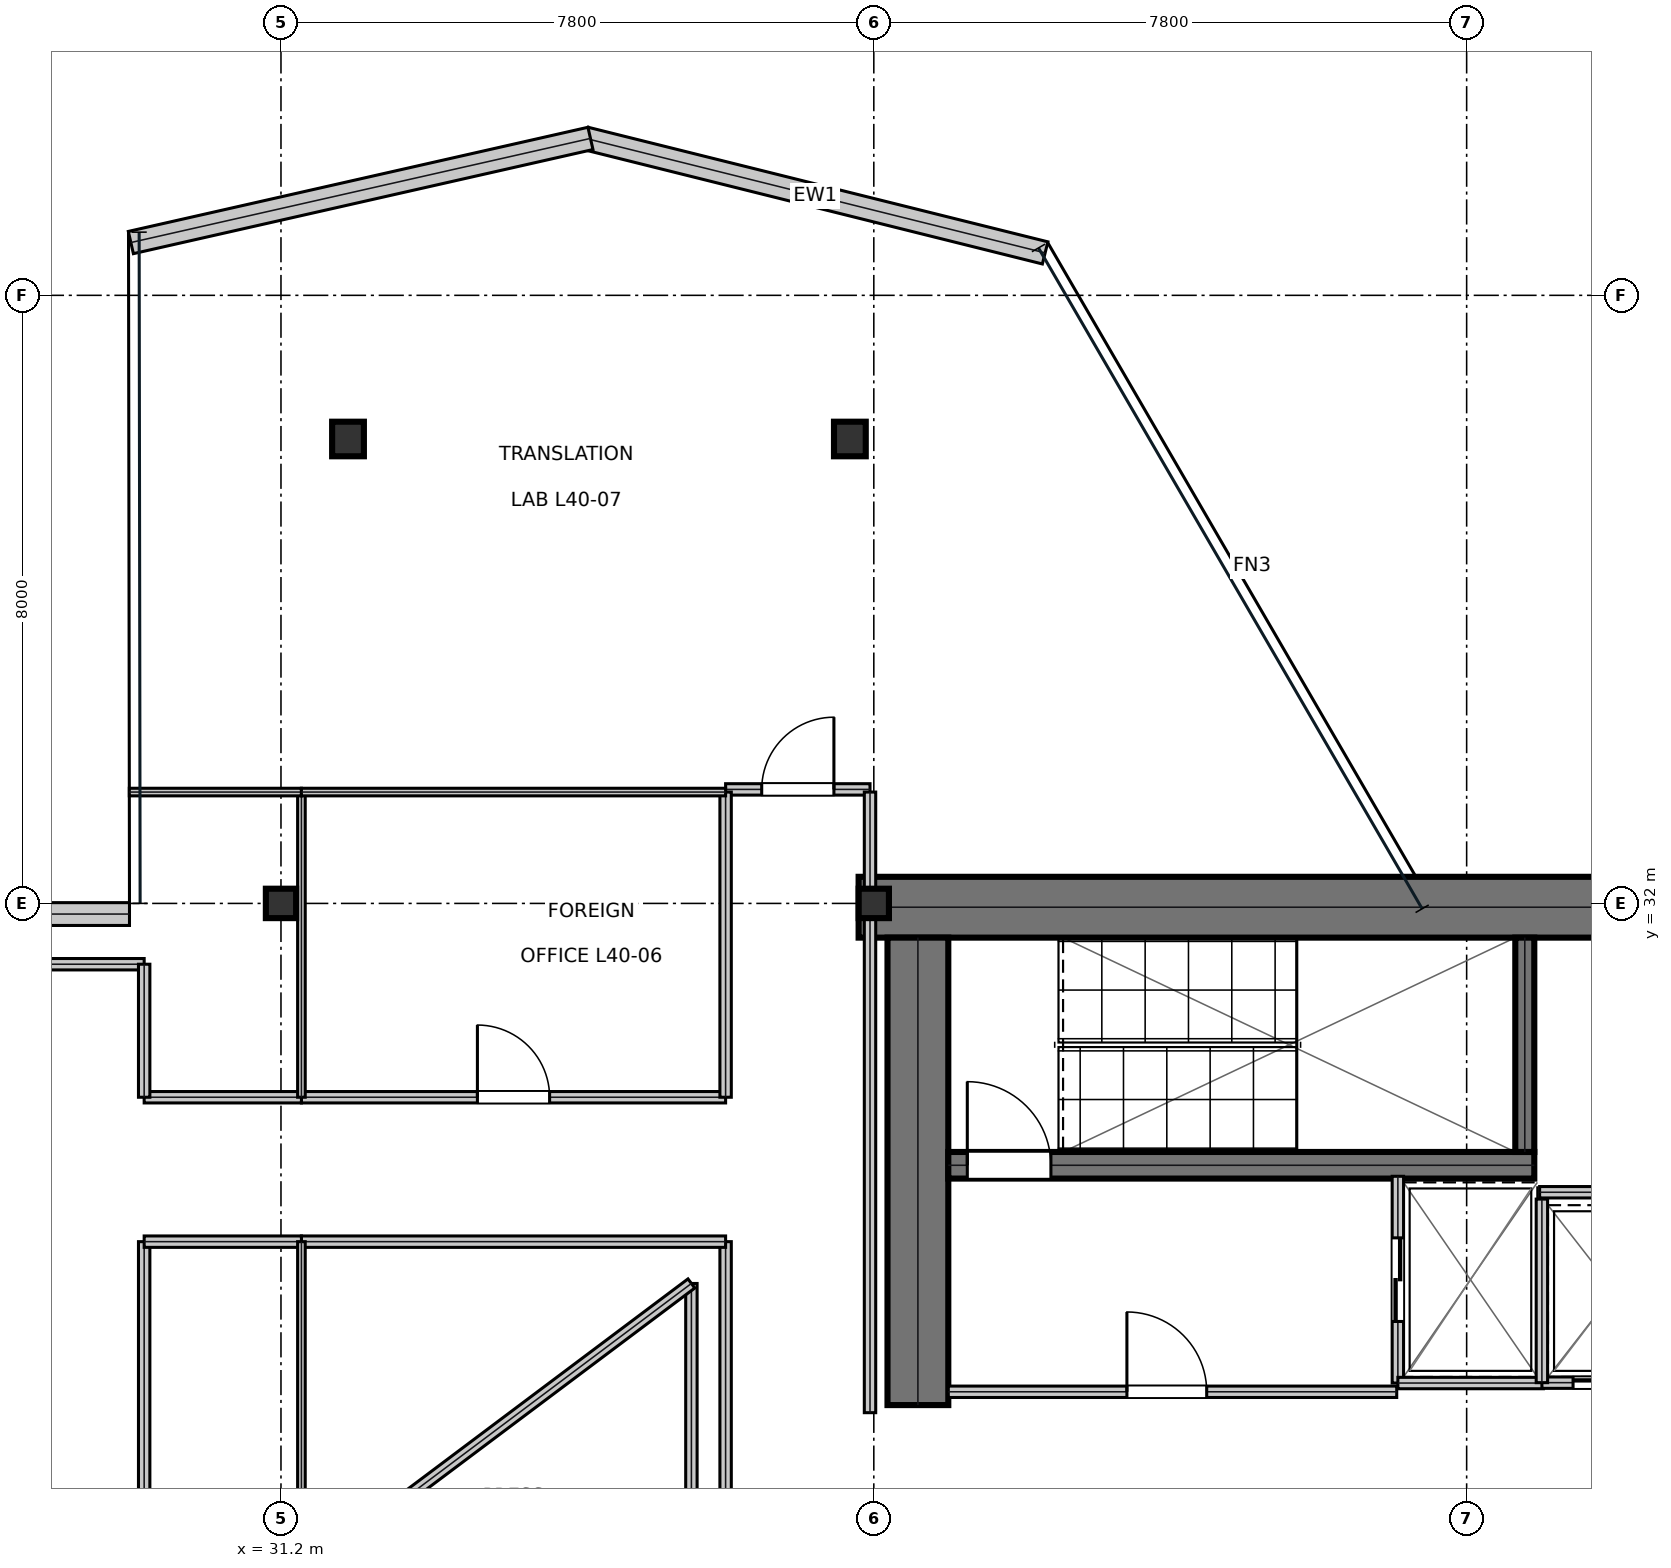
"""IFC4 building model, lengths in metres.
Left out: names, types, materials, properties, quantities, classifications, styles, units other than length and angle.
Written with IfcOpenShell. Run it as: python <this file> out.ifc"""

import sys

from ifc_helpers import new_model, si_unit, direction, frame, frame_2d, origin, origin_2d, place, context, subcontext, project, spatial, rectangle, i_section, extrude, element, fill, save


model = new_model("IFC4")
c1 = context("Model", 3, precision=1e-05, world=origin(), true_north=direction((0.0, 1.0)))
c2 = subcontext(c1, "Body", "Model", "MODEL_VIEW")
j1 = project(units=[si_unit("LENGTHUNIT", "METRE"), si_unit("PLANEANGLEUNIT", "RADIAN")], contexts=[c1])
p1 = place(None, origin())
s1 = spatial("IfcSite", under=j1, at=p1, CompositionType="ELEMENT")
p2 = place(p1, origin())
s2 = spatial("IfcBuilding", under=s1, at=p2, CompositionType="ELEMENT")
p3 = place(p2, frame((0.0, 0.0, 173.55)))
s3 = spatial("IfcBuildingStorey", under=s2, at=p3, CompositionType="ELEMENT", Elevation=173.55)
p4 = place(p3, frame((38.8, 31.95, 0.0), z_axis=(0.0, 0.0, 1.0), x_axis=(1.0, 0.0, 0.0)))
e1 = element("IfcWall", 1, at=p4, inside=s3, PredefinedType="SHEAR", context=c2, shape_type="SweptSolid", body=[
    extrude(rectangle(XDim=16.0, YDim=0.8, at=frame_2d((8.0, 0.0))), origin(), (0.0, 0.0, 1.0), 3.81),
])
p5 = place(p3, frame((39.58, 25.4, 0.0), z_axis=(0.0, 0.0, 1.0), x_axis=(0.0, 1.0, 0.0)))
e2 = element("IfcWall", 2, at=p5, inside=s3, PredefinedType="SHEAR", context=c2, shape_type="SweptSolid", body=[
    extrude(rectangle(XDim=6.15, YDim=0.8, at=frame_2d((3.075, 0.0))), origin(), (0.0, 0.0, 1.0), 3.81),
])
p6 = place(p3, frame((39.98, 28.555, 0.0), z_axis=(0.0, 0.0, 1.0), x_axis=(1.0, 0.0, 0.0)))
e3 = element("IfcWall", 3, at=p6, inside=s3, PredefinedType="SHEAR", context=c2, shape_type="SweptSolid", body=[
    extrude(rectangle(XDim=7.71, YDim=0.35, at=frame_2d((3.855, 0.0))), origin(), (0.0, 0.0, 1.0), 3.81),
])
p7 = place(p6, frame((0.25, 0.0, 0.0)))
e4 = element("IfcOpeningElement", 4, at=p7, cuts=e3, PredefinedType="OPENING", context=c2, shape_type="SweptSolid", body=[
    extrude(rectangle(XDim=1.1, YDim=2.15, at=frame_2d((0.55, 1.075))), frame((0.0, 0.185, 0.0), z_axis=(0.0, -1.0, 0.0), x_axis=(1.0, 0.0, 0.0)), (0.0, 0.0, 1.0), 0.37),
])
p8 = place(p3, frame((47.565, 28.73, 0.0), z_axis=(0.0, 0.0, 1.0), x_axis=(0.0, 1.0, 0.0)))
e5 = element("IfcWall", 5, at=p8, inside=s3, PredefinedType="SHEAR", context=c2, shape_type="SweptSolid", body=[
    extrude(rectangle(XDim=2.82, YDim=0.25, at=frame_2d((1.41, 0.0))), origin(), (0.0, 0.0, 1.0), 3.81),
])
for number, where, z_axis, x_axis in (
    (6, (31.2, 32.0, 0.0), (0.0, 0.0, 1.0), (1.0, 0.0, 0.0)),
    (7, (39.0, 32.0, 0.0), (0.0, 0.0, 1.0), (1.0, 0.0, 0.0)),
):
    element("IfcColumn", number, at=place(p3, frame(where, z_axis=z_axis, x_axis=x_axis)), inside=s3, PredefinedType="COLUMN", context=c2, shape_type="SweptSolid", body=[
        extrude(i_section(OverallWidth=0.398, OverallDepth=0.387, WebThickness=0.021, FlangeThickness=0.033, at=origin_2d()), origin(), (0.0, 0.0, 1.0), 4.044),
    ])
p9 = place(p3, frame((32.082, 38.11, 0.016), z_axis=(0.010447648562, -0.022413850693, 0.999694186207), x_axis=(0.906371306068, 0.422482018004, 0.0)))
e8 = element("IfcColumn", 8, at=p9, inside=s3, PredefinedType="COLUMN", context=c2, shape_type="SweptSolid", body=[
    extrude(i_section(OverallWidth=0.418, OverallDepth=0.455, WebThickness=0.042, FlangeThickness=0.068, at=origin_2d()), origin(), (0.0, 0.0, 1.0), 4.019),
])
p10 = place(p3, frame((38.685, 38.11, 0.016), z_axis=(-0.003766191696, -0.022414915097, 0.999741660321), x_axis=(0.986176372522, -0.165699011101, 0.0)))
e9 = element("IfcColumn", 9, at=p10, inside=s3, PredefinedType="COLUMN", context=c2, shape_type="SweptSolid", body=[
    extrude(i_section(OverallWidth=0.418, OverallDepth=0.455, WebThickness=0.042, FlangeThickness=0.068, at=origin_2d()), origin(), (0.0, 0.0, 1.0), 4.019),
])
p11 = place(p3, frame((41.254, 40.558, 0.0), z_axis=(0.0, 0.0, 1.0), x_axis=(-0.970319679145, 0.241825805619, 0.0)))
e10 = element("IfcWall", 10, at=p11, inside=s3, PredefinedType="STANDARD", context=c2, shape_type="SweptSolid", body=[
    extrude(rectangle(XDim=6.232, YDim=0.3, at=frame_2d((3.116, 0.0))), origin(), (0.0, 0.0, 1.0), 3.81),
])
p12 = place(p3, frame((35.272, 42.064, 0.0), z_axis=(0.0, 0.0, 1.0), x_axis=(-0.975288491541, -0.220935190199, 0.0)))
e11 = element("IfcWall", 11, at=p12, inside=s3, PredefinedType="STANDARD", context=c2, shape_type="SweptSolid", body=[
    extrude(rectangle(XDim=6.2, YDim=0.3, at=frame_2d((3.1, 0.0))), origin(), (0.0, 0.0, 1.0), 3.81),
])
p13 = place(p3, frame((29.207, 31.86, 0.0), z_axis=(0.0, 0.0, 1.0), x_axis=(-1.0, 0.0, 0.0)))
e12 = element("IfcWall", 12, at=p13, inside=s3, PredefinedType="STANDARD", context=c2, shape_type="SweptSolid", body=[
    extrude(rectangle(XDim=2.799, YDim=0.3, at=frame_2d((1.399, 0.0))), origin(), (0.0, 0.0, 1.0), 3.81),
])
p14 = place(p3, frame((39.98, 25.575, 0.0), z_axis=(0.0, 0.0, 1.0), x_axis=(1.0, 0.0, 0.0)))
e13 = element("IfcWall", 13, at=p14, inside=s3, PredefinedType="PARTITIONING", context=c2, shape_type="SweptSolid", body=[
    extrude(rectangle(XDim=5.9, YDim=0.15, at=frame_2d((2.95, 0.0))), origin(), (0.0, 0.0, 1.0), 3.81),
])
p15 = place(p14, frame((2.35, 0.0, 0.0)))
e14 = element("IfcOpeningElement", 14, at=p15, cuts=e13, PredefinedType="OPENING", context=c2, shape_type="SweptSolid", body=[
    extrude(rectangle(XDim=1.05, YDim=2.15, at=frame_2d((0.525, 1.075))), frame((0.0, 0.085, 0.0), z_axis=(0.0, -1.0, 0.0), x_axis=(1.0, 0.0, 0.0)), (0.0, 0.0, 1.0), 0.17),
])
p16 = place(p3, frame((45.895, 25.69, 0.0), z_axis=(0.0, 0.0, 1.0), x_axis=(0.0, 1.0, 0.0)))
e15 = element("IfcWall", 15, at=p16, inside=s3, PredefinedType="PARTITIONING", context=c2, shape_type="SweptSolid", body=[
    extrude(rectangle(XDim=2.72, YDim=0.15, at=frame_2d((1.36, 0.0))), origin(), (0.0, 0.0, 1.0), 3.81),
])
p17 = place(p16, frame((0.81, 0.0, 0.0)))
e16 = element("IfcOpeningElement", 16, at=p17, cuts=e15, PredefinedType="OPENING", context=c2, shape_type="SweptSolid", body=[
    extrude(rectangle(XDim=1.1, YDim=2.15, at=frame_2d((0.55, 1.075))), frame((0.0, 0.085, 0.0), z_axis=(0.0, -1.0, 0.0), x_axis=(1.0, 0.0, 0.0)), (0.0, 0.0, 1.0), 0.17),
])
p18 = place(p3, frame((45.895, 25.69, 0.0), z_axis=(0.0, 0.0, 1.0), x_axis=(1.0, 0.0, 0.0)))
e17 = element("IfcWall", 17, at=p18, inside=s3, PredefinedType="PARTITIONING", context=c2, shape_type="SweptSolid", body=[
    extrude(rectangle(XDim=1.915, YDim=0.15, at=frame_2d((0.958, 0.0))), origin(), (0.0, 0.0, 1.0), 3.81),
])
p19 = place(p3, frame((47.79, 25.695, 0.0), z_axis=(0.0, 0.0, 1.0), x_axis=(1.0, 0.0, 0.0)))
e18 = element("IfcWall", 18, at=p19, inside=s3, PredefinedType="PARTITIONING", context=c2, shape_type="SweptSolid", body=[
    extrude(rectangle(XDim=1.92, YDim=0.15, at=frame_2d((0.96, 0.0))), origin(), (0.0, 0.0, 1.0), 3.81),
])
p20 = place(p19, frame((0.41, 0.0, 0.0)))
e19 = element("IfcOpeningElement", 19, at=p20, cuts=e18, PredefinedType="OPENING", context=c2, shape_type="SweptSolid", body=[
    extrude(rectangle(XDim=1.1, YDim=2.15, at=frame_2d((0.55, 1.075))), frame((0.0, 0.085, 0.0), z_axis=(0.0, -1.0, 0.0), x_axis=(1.0, 0.0, 0.0)), (0.0, 0.0, 1.0), 0.17),
])
p21 = place(p3, frame((47.79, 25.695, 0.0), z_axis=(0.0, 0.0, 1.0), x_axis=(0.0, 1.0, 0.0)))
e20 = element("IfcWall", 20, at=p21, inside=s3, PredefinedType="PARTITIONING", context=c2, shape_type="SweptSolid", body=[
    extrude(rectangle(XDim=2.415, YDim=0.15, at=frame_2d((1.208, 0.0))), origin(), (0.0, 0.0, 1.0), 3.81),
])
p22 = place(p3, frame((47.76, 28.2, 0.0), z_axis=(0.0, 0.0, 1.0), x_axis=(1.0, 0.0, 0.0)))
e21 = element("IfcWall", 21, at=p22, inside=s3, PredefinedType="PARTITIONING", context=c2, shape_type="SweptSolid", body=[
    extrude(rectangle(XDim=1.99, YDim=0.15, at=frame_2d((0.995, 0.0))), origin(), (0.0, 0.0, 1.0), 3.81),
])
p23 = place(p3, frame((37.05, 14.535, 0.0), z_axis=(0.0, 0.0, 1.0), x_axis=(0.0, 1.0, 0.0)))
e22 = element("IfcWall", 22, at=p23, inside=s3, PredefinedType="PARTITIONING", context=c2, shape_type="SweptSolid", body=[
    extrude(rectangle(XDim=13.015, YDim=0.15, at=frame_2d((6.508, 0.0))), origin(), (0.0, 0.0, 1.0), 3.19),
])
p24 = place(p23, frame((4.593, 0.0, 0.0)))
e23 = element("IfcOpeningElement", 23, at=p24, cuts=e22, PredefinedType="OPENING", context=c2, shape_type="SweptSolid", body=[
    extrude(rectangle(XDim=0.95, YDim=2.15, at=frame_2d((0.475, 1.075))), frame((0.0, 0.085, 0.0), z_axis=(0.0, -1.0, 0.0), x_axis=(1.0, 0.0, 0.0)), (0.0, 0.0, 1.0), 0.17),
])
p25 = place(p3, frame((29.4, 16.8, 0.0), z_axis=(0.0, 0.0, 1.0), x_axis=(0.0, 1.0, 0.0)))
e24 = element("IfcWall", 24, at=p25, inside=s3, PredefinedType="PARTITIONING", context=c2, shape_type="SweptSolid", body=[
    extrude(rectangle(XDim=10.75, YDim=0.15, at=frame_2d((5.375, 0.0))), origin(), (0.0, 0.0, 1.0), 3.19),
])
p26 = place(p25, frame((4.54, 0.0, 0.0)))
e25 = element("IfcOpeningElement", 25, at=p26, cuts=e24, PredefinedType="OPENING", context=c2, shape_type="SweptSolid", body=[
    extrude(rectangle(XDim=0.95, YDim=2.15, at=frame_2d((0.475, 1.075))), frame((0.0, 0.085, 0.0), z_axis=(0.0, -1.0, 0.0), x_axis=(1.0, 0.0, 0.0)), (0.0, 0.0, 1.0), 0.17),
])
p27 = place(p3, frame((31.469, 29.45, 0.0), z_axis=(0.0, 0.0, 1.0), x_axis=(1.0, 0.0, 0.0)))
e26 = element("IfcWall", 26, at=p27, inside=s3, PredefinedType="PARTITIONING", context=c2, shape_type="SweptSolid", body=[
    extrude(rectangle(XDim=5.581, YDim=0.15, at=frame_2d((2.791, 0.0))), origin(), (0.0, 0.0, 1.0), 3.81),
])
p28 = place(p27, frame((2.315, 0.0, 0.0)))
e27 = element("IfcOpeningElement", 27, at=p28, cuts=e26, PredefinedType="OPENING", context=c2, shape_type="SweptSolid", body=[
    extrude(rectangle(XDim=0.95, YDim=2.15, at=frame_2d((0.475, 1.075))), frame((0.0, 0.085, 0.0), z_axis=(0.0, -1.0, 0.0), x_axis=(1.0, 0.0, 0.0)), (0.0, 0.0, 1.0), 0.17),
])
p29 = place(p3, frame((37.05, 33.5, 0.0), z_axis=(0.0, 0.0, 1.0), x_axis=(1.0, 0.0, 0.0)))
e28 = element("IfcWall", 28, at=p29, inside=s3, PredefinedType="PARTITIONING", context=c2, shape_type="SweptSolid", body=[
    extrude(rectangle(XDim=1.9, YDim=0.15, at=frame_2d((0.95, 0.0))), origin(), (0.0, 0.0, 1.0), 3.19),
])
p30 = place(p29, frame((0.475, 0.0, 0.0)))
e29 = element("IfcOpeningElement", 29, at=p30, cuts=e28, PredefinedType="OPENING", context=c2, shape_type="SweptSolid", body=[
    extrude(rectangle(XDim=0.95, YDim=2.15, at=frame_2d((0.475, 1.075))), frame((0.0, 0.085, 0.0), z_axis=(0.0, -1.0, 0.0), x_axis=(1.0, 0.0, 0.0)), (0.0, 0.0, 1.0), 0.17),
])
p31 = place(p3, frame((31.469, 27.55, 0.0), z_axis=(0.0, 0.0, 1.0), x_axis=(1.0, 0.0, 0.0)))
e30 = element("IfcWall", 30, at=p31, inside=s3, PredefinedType="PARTITIONING", context=c2, shape_type="SweptSolid", body=[
    extrude(rectangle(XDim=5.581, YDim=0.15, at=frame_2d((2.791, 0.0))), origin(), (0.0, 0.0, 1.0), 3.443),
])
for number, where, z_axis, x_axis in (
    (31, (29.4, 27.55, 0.0), (0.0, 0.0, 1.0), (1.0, 0.0, 0.0)),
    (32, (29.4, 29.45, 0.0), (0.0, 0.0, 1.0), (1.0, 0.0, 0.0)),
):
    element("IfcWall", number, at=place(p3, frame(where, z_axis=z_axis, x_axis=x_axis)), inside=s3, PredefinedType="PARTITIONING", context=c2, shape_type="SweptSolid", body=[
        extrude(rectangle(XDim=2.069, YDim=0.15, at=frame_2d((1.035, 0.0))), origin(), (0.0, 0.0, 1.0), 3.19),
    ])
p32 = place(p3, frame((27.5, 31.2, 0.0), z_axis=(0.0, 0.0, 1.0), x_axis=(1.0, 0.0, 0.0)))
e33 = element("IfcWall", 33, at=p32, inside=s3, PredefinedType="PARTITIONING", context=c2, shape_type="SweptSolid", body=[
    extrude(rectangle(XDim=1.9, YDim=0.15, at=frame_2d((0.95, 0.0))), origin(), (0.0, 0.0, 1.0), 3.338),
])
p33 = place(p3, frame((29.4, 29.45, 0.0), z_axis=(0.0, 0.0, 1.0), x_axis=(0.0, 1.0, 0.0)))
e34 = element("IfcWall", 34, at=p33, inside=s3, PredefinedType="PARTITIONING", context=c2, shape_type="SweptSolid", body=[
    extrude(rectangle(XDim=1.75, YDim=0.15, at=frame_2d((0.875, 0.0))), origin(), (0.0, 0.0, 1.0), 3.81),
])
p34 = place(p3, frame((37.05, 29.45, 0.0), z_axis=(0.0, 0.0, 1.0), x_axis=(0.0, 1.0, 0.0)))
e35 = element("IfcWall", 35, at=p34, inside=s3, PredefinedType="PARTITIONING", context=c2, shape_type="SweptSolid", body=[
    extrude(rectangle(XDim=4.015, YDim=0.15, at=frame_2d((2.008, 0.0))), origin(), (0.0, 0.0, 1.0), 3.19),
])
p35 = place(p3, frame((38.95, 25.3, 0.0), z_axis=(0.0, 0.0, 1.0), x_axis=(0.0, 1.0, 0.0)))
e36 = element("IfcWall", 36, at=p35, inside=s3, PredefinedType="PARTITIONING", context=c2, shape_type="SweptSolid", body=[
    extrude(rectangle(XDim=8.165, YDim=0.15, at=frame_2d((4.083, 0.0))), origin(), (0.0, 0.0, 1.0), 3.19),
])
p36 = place(p3, frame((31.469, 14.535, 0.0), z_axis=(0.0, 0.0, 1.0), x_axis=(0.0, 1.0, 0.0)))
e37 = element("IfcWall", 37, at=p36, inside=s3, PredefinedType="PARTITIONING", context=c2, shape_type="SweptSolid", body=[
    extrude(rectangle(XDim=13.015, YDim=0.1, at=frame_2d((6.508, 0.0))), origin(), (0.0, 0.0, 1.0), 3.19),
])
p37 = place(p3, frame((31.469, 29.45, 0.0), z_axis=(0.0, 0.0, 1.0), x_axis=(0.0, 1.0, 0.0)))
e38 = element("IfcWall", 38, at=p37, inside=s3, PredefinedType="PARTITIONING", context=c2, shape_type="SweptSolid", body=[
    extrude(rectangle(XDim=4.015, YDim=0.1, at=frame_2d((2.008, 0.0))), origin(), (0.0, 0.0, 1.0), 3.19),
])
p38 = place(p3, frame((29.205, 33.465, 0.0), z_axis=(0.0, 0.0, 1.0), x_axis=(1.0, 0.0, 0.0)))
e39 = element("IfcWall", 39, at=p38, inside=s3, PredefinedType="PARTITIONING", context=c2, shape_type="SweptSolid", body=[
    extrude(rectangle(XDim=2.264, YDim=0.1, at=frame_2d((1.132, 0.0))), origin(), (0.0, 0.0, 1.0), 3.81),
])
p39 = place(p3, frame((31.469, 33.465, 0.0), z_axis=(0.0, 0.0, 1.0), x_axis=(1.0, 0.0, 0.0)))
e40 = element("IfcWall", 40, at=p39, inside=s3, PredefinedType="PARTITIONING", context=c2, shape_type="SweptSolid", body=[
    extrude(rectangle(XDim=5.581, YDim=0.1, at=frame_2d((2.791, 0.0))), origin(), (0.0, 0.0, 1.0), 3.81),
])
p40 = place(p3, frame((36.6, 21.0, 0.0), z_axis=(0.0, 0.0, 1.0), x_axis=(0.0, 1.0, 0.0)))
e41 = element("IfcWall", 41, at=p40, inside=s3, PredefinedType="MOVABLE", context=c2, shape_type="SweptSolid", body=[
    extrude(rectangle(XDim=6.0, YDim=0.15, at=frame_2d((3.0, 0.0))), origin(), (0.0, 0.0, 1.0), 3.81),
])
p41 = place(p3, frame((36.6, 27.0, 0.0), z_axis=(0.0, 0.0, 1.0), x_axis=(-0.8, -0.6, 0.0)))
e42 = element("IfcWall", 42, at=p41, inside=s3, PredefinedType="MOVABLE", context=c2, shape_type="SweptSolid", body=[
    extrude(rectangle(XDim=5.0, YDim=0.15, at=frame_2d((2.5, 0.0))), origin(), (0.0, 0.0, 1.0), 3.81),
])
p42 = place(p15, origin())
e43 = element("IfcDoor", 43, at=p42, inside=s3, OperationType="SINGLE_SWING_LEFT", PredefinedType="DOOR", context=c2, shape_type="SweptSolid", body=[
    extrude(rectangle(XDim=1.05, YDim=2.15, at=frame_2d((0.525, 1.075))), frame((0.0, 0.025, 0.0), z_axis=(0.0, -1.0, 0.0), x_axis=(1.0, 0.0, 0.0)), (0.0, 0.0, 1.0), 0.05),
])
fill(e14, e43)
p43 = place(p17, frame((1.1, 0.0, 0.0), z_axis=(0.0, 0.0, 1.0), x_axis=(-1.0, 0.0, 0.0)))
e44 = element("IfcDoor", 44, at=p43, inside=s3, OperationType="DOUBLE_DOOR_SLIDING", PredefinedType="DOOR", context=c2, shape_type="SweptSolid", body=[
    extrude(rectangle(XDim=1.1, YDim=2.15, at=frame_2d((0.55, 1.075))), frame((0.0, 0.025, 0.0), z_axis=(0.0, -1.0, 0.0), x_axis=(1.0, 0.0, 0.0)), (0.0, 0.0, 1.0), 0.05),
])
fill(e16, e44)
p44 = place(p20, frame((1.1, 0.0, 0.0), z_axis=(0.0, 0.0, 1.0), x_axis=(-1.0, 0.0, 0.0)))
e45 = element("IfcDoor", 45, at=p44, inside=s3, OperationType="DOUBLE_DOOR_SLIDING", PredefinedType="DOOR", context=c2, shape_type="SweptSolid", body=[
    extrude(rectangle(XDim=1.1, YDim=2.15, at=frame_2d((0.55, 1.075))), frame((0.0, 0.025, 0.0), z_axis=(0.0, -1.0, 0.0), x_axis=(1.0, 0.0, 0.0)), (0.0, 0.0, 1.0), 0.05),
])
fill(e19, e45)
p45 = place(p28, origin())
e46 = element("IfcDoor", 46, at=p45, inside=s3, OperationType="SINGLE_SWING_LEFT", PredefinedType="DOOR", context=c2, shape_type="SweptSolid", body=[
    extrude(rectangle(XDim=0.95, YDim=2.15, at=frame_2d((0.475, 1.075))), frame((0.0, 0.025, 0.0), z_axis=(0.0, -1.0, 0.0), x_axis=(1.0, 0.0, 0.0)), (0.0, 0.0, 1.0), 0.05),
])
fill(e27, e46)
p46 = place(p30, origin())
e47 = element("IfcDoor", 47, at=p46, inside=s3, OperationType="SINGLE_SWING_RIGHT", PredefinedType="DOOR", context=c2, shape_type="SweptSolid", body=[
    extrude(rectangle(XDim=0.95, YDim=2.15, at=frame_2d((0.475, 1.075))), frame((0.0, 0.025, 0.0), z_axis=(0.0, -1.0, 0.0), x_axis=(1.0, 0.0, 0.0)), (0.0, 0.0, 1.0), 0.05),
])
fill(e29, e47)
p47 = place(p7, origin())
e48 = element("IfcDoor", 48, at=p47, inside=s3, OperationType="SINGLE_SWING_LEFT", PredefinedType="DOOR", context=c2, shape_type="SweptSolid", body=[
    extrude(rectangle(XDim=1.1, YDim=2.15, at=frame_2d((0.55, 1.075))), frame((0.0, 0.025, 0.0), z_axis=(0.0, -1.0, 0.0), x_axis=(1.0, 0.0, 0.0)), (0.0, 0.0, 1.0), 0.05),
])
fill(e4, e48)
save(model, sys.argv[1])
